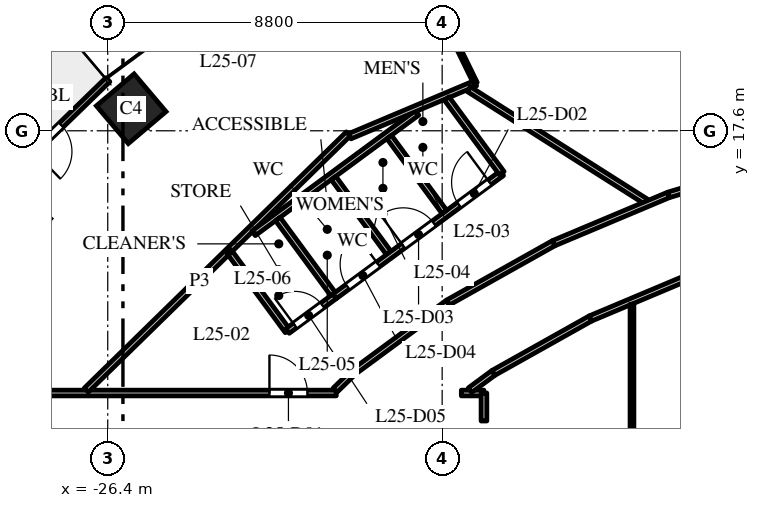
"""IFC4 building model, lengths in metres.
Left out: names, types, materials, properties, quantities, classifications, styles, units other than length and angle.
Written with IfcOpenShell. Run it as: python <this file> out.ifc"""

import sys

from ifc_helpers import new_model, si_unit, direction, frame, frame_2d, origin, origin_2d, place, context, subcontext, project, spatial, rectangle, extrude, element, fill, save


model = new_model("IFC4")
c1 = context("Model", 3, precision=1e-05, world=origin(), true_north=direction((0.0, 1.0)))
c2 = subcontext(c1, "Body", "Model", "MODEL_VIEW")
j1 = project(units=[si_unit("LENGTHUNIT", "METRE"), si_unit("PLANEANGLEUNIT", "RADIAN")], contexts=[c1])
p1 = place(None, origin())
s1 = spatial("IfcSite", under=j1, at=p1, CompositionType="ELEMENT")
p2 = place(p1, origin())
s2 = spatial("IfcBuilding", under=s1, at=p2, CompositionType="ELEMENT")
p3 = place(p2, frame((0.0, 0.0, 112.0)))
s3 = spatial("IfcBuildingStorey", under=s2, at=p3, CompositionType="ELEMENT", Elevation=112.0)
p4 = place(p3, frame((-25.783, 18.18, 0.0), z_axis=(0.0, 0.0, 1.0), x_axis=(-0.763035199656, -0.646356932419, 0.0)))
e1 = element("IfcColumn", 1, at=p4, inside=s3, PredefinedType="COLUMN", context=c2, shape_type="SweptSolid", body=[
    extrude(rectangle(XDim=1.3, YDim=1.3, at=origin_2d()), origin(), (0.0, 0.0, 1.0), 4.0),
])
p5 = place(p3, frame((-26.396, 18.943, 0.0), z_axis=(0.0, 0.0, 1.0), x_axis=(-0.717214761864, -0.696852197647, 0.0)))
e2 = element("IfcWall", 2, at=p5, inside=s3, PredefinedType="STANDARD", context=c2, shape_type="SweptSolid", body=[
    extrude(rectangle(XDim=4.424, YDim=0.15, at=frame_2d((2.212, 0.0))), origin(), (0.0, 0.0, 1.0), 3.7),
])
p6 = place(p5, frame((1.712, 0.0, 0.0)))
e3 = element("IfcOpeningElement", 3, at=p6, cuts=e2, PredefinedType="OPENING", context=c2, shape_type="SweptSolid", body=[
    extrude(rectangle(XDim=1.0, YDim=2.4, at=frame_2d((0.5, 1.2))), frame((0.0, 0.085, 0.0), z_axis=(0.0, -1.0, 0.0), x_axis=(1.0, 0.0, 0.0)), (0.0, 0.0, 1.0), 0.17),
])
p7 = place(p3, frame((-31.5, 10.7, 0.0), z_axis=(0.0, 0.0, 1.0), x_axis=(1.0, 0.0, 0.0)))
e4 = element("IfcWall", 4, at=p7, inside=s3, PredefinedType="PARTITIONING", context=c2, shape_type="SweptSolid", body=[
    extrude(rectangle(XDim=11.113, YDim=0.15, at=frame_2d((5.557, 0.0))), origin(), (0.0, 0.0, 1.0), 3.1),
])
p8 = place(p7, frame((9.355, 0.0, 0.0)))
e5 = element("IfcOpeningElement", 5, at=p8, cuts=e4, PredefinedType="OPENING", context=c2, shape_type="SweptSolid", body=[
    extrude(rectangle(XDim=1.0, YDim=2.1, at=frame_2d((0.5, 1.05))), frame((0.0, 0.085, 0.0), z_axis=(0.0, -1.0, 0.0), x_axis=(1.0, 0.0, 0.0)), (0.0, 0.0, 1.0), 0.17),
])
p9 = place(p7, frame((1.311, 0.0, 0.0)))
e6 = element("IfcOpeningElement", 6, at=p9, cuts=e4, PredefinedType="OPENING", context=c2, shape_type="SweptSolid", body=[
    extrude(rectangle(XDim=1.0, YDim=2.1, at=frame_2d((0.5, 1.05))), frame((0.0, 0.085, 0.0), z_axis=(0.0, -1.0, 0.0), x_axis=(1.0, 0.0, 0.0)), (0.0, 0.0, 1.0), 0.17),
])
p10 = place(p3, frame((-26.964, 10.777, 0.0), z_axis=(0.0, 0.0, 1.0), x_axis=(0.715000199822, 0.69912424808, 0.0)))
e7 = element("IfcWall", 7, at=p10, inside=s3, PredefinedType="PARTITIONING", context=c2, shape_type="SweptSolid", body=[
    extrude(rectangle(XDim=9.642, YDim=0.15, at=frame_2d((4.821, 0.0))), origin(), (0.0, 0.0, 1.0), 2.75),
])
p11 = place(p3, frame((-23.207, 14.422, 0.0), z_axis=(0.0, 0.0, 1.0), x_axis=(0.592948747936, -0.80524020163, 0.0)))
e8 = element("IfcWall", 8, at=p11, inside=s3, PredefinedType="PARTITIONING", context=c2, shape_type="SweptSolid", body=[
    extrude(rectangle(XDim=2.596, YDim=0.15, at=frame_2d((1.298, 0.0))), origin(), (0.0, 0.0, 1.0), 3.7),
])
p12 = place(p3, frame((-22.562, 14.902, 0.0), z_axis=(0.0, 0.0, 1.0), x_axis=(0.805140814791, 0.593083694227, 0.0)))
e9 = element("IfcWall", 9, at=p12, inside=s3, PredefinedType="PARTITIONING", context=c2, shape_type="SweptSolid", body=[
    extrude(rectangle(XDim=5.343, YDim=0.15, at=frame_2d((2.672, 0.0))), origin(), (0.0, 0.0, 1.0), 2.75),
])
p13 = place(p3, frame((-21.925, 15.279, 0.0), z_axis=(0.0, 0.0, 1.0), x_axis=(0.592783466835, -0.805361882291, 0.0)))
e10 = element("IfcWall", 10, at=p13, inside=s3, PredefinedType="PARTITIONING", context=c2, shape_type="SweptSolid", body=[
    extrude(rectangle(XDim=2.525, YDim=0.15, at=frame_2d((1.263, 0.0))), origin(), (0.0, 0.0, 1.0), 3.7),
])
p14 = place(p3, frame((-21.668, 12.332, 0.0), z_axis=(0.0, 0.0, 1.0), x_axis=(0.805239105185, 0.592950236935, 0.0)))
e11 = element("IfcWall", 11, at=p14, inside=s3, PredefinedType="PARTITIONING", context=c2, shape_type="SweptSolid", body=[
    extrude(rectangle(XDim=1.54, YDim=0.15, at=frame_2d((0.77, 0.0))), origin(), (0.0, 0.0, 1.0), 3.7),
])
p15 = place(p14, frame((0.24, 0.0, 0.0)))
e12 = element("IfcOpeningElement", 12, at=p15, cuts=e11, PredefinedType="OPENING", context=c2, shape_type="SweptSolid", body=[
    extrude(rectangle(XDim=0.9, YDim=2.1, at=frame_2d((0.45, 1.05))), frame((0.0, 0.085, 0.0), z_axis=(0.0, -1.0, 0.0), x_axis=(1.0, 0.0, 0.0)), (0.0, 0.0, 1.0), 0.17),
])
p16 = place(p3, frame((-20.46, 16.358, 0.0), z_axis=(0.0, 0.0, 1.0), x_axis=(0.59304615898, -0.805168462695, 0.0)))
e13 = element("IfcWall", 13, at=p16, inside=s3, PredefinedType="PARTITIONING", context=c2, shape_type="SweptSolid", body=[
    extrude(rectangle(XDim=2.451, YDim=0.15, at=frame_2d((1.226, 0.0))), origin(), (0.0, 0.0, 1.0), 3.7),
])
p17 = place(p3, frame((-20.418, 10.775, 0.0), z_axis=(0.0, 0.0, 1.0), x_axis=(0.717033879939, 0.697038316751, 0.0)))
e14 = element("IfcWall", 14, at=p17, inside=s3, PredefinedType="PARTITIONING", context=c2, shape_type="SweptSolid", body=[
    extrude(rectangle(XDim=0.696, YDim=0.15, at=frame_2d((0.348, 0.0))), origin(), (0.0, 0.0, 1.0), 3.7),
])
p18 = place(p3, frame((-20.428, 13.245, 0.0), z_axis=(0.0, 0.0, 1.0), x_axis=(0.80538609279, 0.592750572788, 0.0)))
e15 = element("IfcWall", 15, at=p18, inside=s3, PredefinedType="PARTITIONING", context=c2, shape_type="SweptSolid", body=[
    extrude(rectangle(XDim=5.461, YDim=0.15, at=frame_2d((2.73, 0.0))), origin(), (0.0, 0.0, 1.0), 2.75),
])
p19 = place(p18, frame((4.061, 0.0, 0.0)))
e16 = element("IfcOpeningElement", 16, at=p19, cuts=e15, PredefinedType="OPENING", context=c2, shape_type="SweptSolid", body=[
    extrude(rectangle(XDim=1.0, YDim=2.1, at=frame_2d((0.5, 1.05))), frame((0.0, 0.085, 0.0), z_axis=(0.0, -1.0, 0.0), x_axis=(1.0, 0.0, 0.0)), (0.0, 0.0, 1.0), 0.17),
])
p20 = place(p18, frame((2.24, 0.0, 0.0)))
e17 = element("IfcOpeningElement", 17, at=p20, cuts=e15, PredefinedType="OPENING", context=c2, shape_type="SweptSolid", body=[
    extrude(rectangle(XDim=1.0, YDim=2.1, at=frame_2d((0.5, 1.05))), frame((0.0, 0.085, 0.0), z_axis=(0.0, -1.0, 0.0), x_axis=(1.0, 0.0, 0.0)), (0.0, 0.0, 1.0), 0.17),
])
p21 = place(p18, frame((0.42, 0.0, 0.0)))
e18 = element("IfcOpeningElement", 18, at=p21, cuts=e15, PredefinedType="OPENING", context=c2, shape_type="SweptSolid", body=[
    extrude(rectangle(XDim=1.0, YDim=2.1, at=frame_2d((0.5, 1.05))), frame((0.0, 0.085, 0.0), z_axis=(0.0, -1.0, 0.0), x_axis=(1.0, 0.0, 0.0)), (0.0, 0.0, 1.0), 0.17),
])
p22 = place(p3, frame((-20.028, 17.457, 0.0), z_axis=(0.0, 0.0, 1.0), x_axis=(0.921396911144, 0.388622866201, 0.0)))
e19 = element("IfcWall", 19, at=p22, inside=s3, PredefinedType="PARTITIONING", context=c2, shape_type="SweptSolid", body=[
    extrude(rectangle(XDim=3.587, YDim=0.15, at=frame_2d((1.793, 0.0))), origin(), (0.0, 0.0, 1.0), 3.7),
])
p23 = place(p3, frame((-19.919, 11.26, 0.0), z_axis=(0.0, 0.0, 1.0), x_axis=(0.805185638843, 0.593022838516, 0.0)))
e20 = element("IfcWall", 20, at=p23, inside=s3, PredefinedType="PARTITIONING", context=c2, shape_type="SweptSolid", body=[
    extrude(rectangle(XDim=3.073, YDim=0.15, at=frame_2d((1.536, 0.0))), origin(), (0.0, 0.0, 1.0), 2.75),
])
p24 = place(p3, frame((-19.086, 23.685, 0.0), z_axis=(0.0, 0.0, 1.0), x_axis=(0.439173510656, -0.898402263765, 0.0)))
e21 = element("IfcWall", 21, at=p24, inside=s3, PredefinedType="PARTITIONING", context=c2, shape_type="SweptSolid", body=[
    extrude(rectangle(XDim=5.381, YDim=0.1, at=frame_2d((2.69, 0.0))), origin(), (0.0, 0.0, 1.0), 3.7),
])
p25 = place(p3, frame((-18.995, 17.437, 0.0), z_axis=(0.0, 0.0, 1.0), x_axis=(0.593300972215, -0.80498071801, 0.0)))
e22 = element("IfcWall", 22, at=p25, inside=s3, PredefinedType="PARTITIONING", context=c2, shape_type="SweptSolid", body=[
    extrude(rectangle(XDim=2.451, YDim=0.15, at=frame_2d((1.226, 0.0))), origin(), (0.0, 0.0, 1.0), 3.7),
])
p26 = place(p3, frame((-17.48, 18.449, 0.0), z_axis=(0.0, 0.0, 1.0), x_axis=(0.593277461832, -0.804998045515, 0.0)))
e23 = element("IfcWall", 23, at=p26, inside=s3, PredefinedType="PARTITIONING", context=c2, shape_type="SweptSolid", body=[
    extrude(rectangle(XDim=2.442, YDim=0.15, at=frame_2d((1.221, 0.0))), origin(), (0.0, 0.0, 1.0), 3.7),
])
p27 = place(p3, frame((-17.445, 13.082, 0.0), z_axis=(0.0, 0.0, 1.0), x_axis=(0.872072095629, 0.489377420837, 0.0)))
e24 = element("IfcWall", 24, at=p27, inside=s3, PredefinedType="PARTITIONING", context=c2, shape_type="SweptSolid", body=[
    extrude(rectangle(XDim=3.188, YDim=0.15, at=frame_2d((1.594, 0.0))), origin(), (0.0, 0.0, 1.0), 3.7),
])
p28 = place(p3, frame((-16.899, 18.695, 0.0), z_axis=(0.0, 0.0, 1.0), x_axis=(0.844493920995, -0.535565138337, 0.0)))
e25 = element("IfcWall", 25, at=p28, inside=s3, PredefinedType="PARTITIONING", context=c2, shape_type="SweptSolid", body=[
    extrude(rectangle(XDim=5.512, YDim=0.15, at=frame_2d((2.756, 0.0))), origin(), (0.0, 0.0, 1.0), 2.85),
])
p29 = place(p3, frame((-17.095, 10.7, 0.0), z_axis=(0.0, 0.0, 1.0), x_axis=(1.0, 0.0, 0.0)))
e26 = element("IfcWall", 26, at=p29, inside=s3, PredefinedType="PARTITIONING", context=c2, shape_type="SweptSolid", body=[
    extrude(rectangle(XDim=0.595, YDim=0.15, at=frame_2d((0.297, 0.0))), origin(), (0.0, 0.0, 1.0), 3.7),
])
p30 = place(p3, frame((-16.867, 10.775, 0.0), z_axis=(0.0, 0.0, 1.0), x_axis=(0.804751563869, 0.593611759023, 0.0)))
e27 = element("IfcWall", 27, at=p30, inside=s3, PredefinedType="PARTITIONING", context=c2, shape_type="SweptSolid", body=[
    extrude(rectangle(XDim=0.767, YDim=0.15, at=frame_2d((0.383, 0.0))), origin(), (0.0, 0.0, 1.0), 3.7),
])
p31 = place(p3, frame((-16.5, 9.964, 0.0), z_axis=(0.0, 0.0, 1.0), x_axis=(0.0, 1.0, 0.0)))
e28 = element("IfcWall", 28, at=p31, inside=s3, PredefinedType="PARTITIONING", context=c2, shape_type="SweptSolid", body=[
    extrude(rectangle(XDim=0.736, YDim=0.15, at=frame_2d((0.368, 0.0))), origin(), (0.0, 0.0, 1.0), 3.7),
])
p32 = place(p3, frame((-16.25, 11.23, 0.0), z_axis=(0.0, 0.0, 1.0), x_axis=(0.872147381065, 0.489243237767, 0.0)))
e29 = element("IfcWall", 29, at=p32, inside=s3, PredefinedType="PARTITIONING", context=c2, shape_type="SweptSolid", body=[
    extrude(rectangle(XDim=2.927, YDim=0.15, at=frame_2d((1.464, 0.0))), origin(), (0.0, 0.0, 1.0), 2.75),
])
p33 = place(p3, frame((-14.665, 14.642, 0.0), z_axis=(0.0, 0.0, 1.0), x_axis=(0.921789499058, 0.38769075231, 0.0)))
e30 = element("IfcWall", 30, at=p33, inside=s3, PredefinedType="PARTITIONING", context=c2, shape_type="SweptSolid", body=[
    extrude(rectangle(XDim=3.278, YDim=0.15, at=frame_2d((1.639, 0.0))), origin(), (0.0, 0.0, 1.0), 2.85),
])
p34 = place(p3, frame((-13.697, 12.662, 0.0), z_axis=(0.0, 0.0, 1.0), x_axis=(0.921751821358, 0.387780324183, 0.0)))
e31 = element("IfcWall", 31, at=p34, inside=s3, PredefinedType="PARTITIONING", context=c2, shape_type="SweptSolid", body=[
    extrude(rectangle(XDim=3.038, YDim=0.15, at=frame_2d((1.519, 0.0))), origin(), (0.0, 0.0, 1.0), 2.85),
])
p35 = place(p3, frame((-12.605, -13.036, 0.0), z_axis=(0.0, 0.0, 1.0), x_axis=(0.0, 1.0, 0.0)))
e32 = element("IfcWall", 32, at=p35, inside=s3, PredefinedType="PARTITIONING", context=c2, shape_type="SweptSolid", body=[
    extrude(rectangle(XDim=26.072, YDim=0.1, at=frame_2d((13.036, 0.0))), origin(), (0.0, 0.0, 1.0), 2.75),
])
p36 = place(p3, frame((-11.643, 15.913, 0.0), z_axis=(0.0, 0.0, 1.0), x_axis=(0.957584891346, 0.288151307243, 0.0)))
e33 = element("IfcWall", 33, at=p36, inside=s3, PredefinedType="PARTITIONING", context=c2, shape_type="SweptSolid", body=[
    extrude(rectangle(XDim=3.345, YDim=0.15, at=frame_2d((1.672, 0.0))), origin(), (0.0, 0.0, 1.0), 3.7),
])
p37 = place(p6, origin())
e34 = element("IfcDoor", 34, at=p37, inside=s3, OperationType="SINGLE_SWING_RIGHT", PredefinedType="DOOR", context=c2, shape_type="SweptSolid", body=[
    extrude(rectangle(XDim=1.0, YDim=2.4, at=frame_2d((0.5, 1.2))), frame((0.0, 0.025, 0.0), z_axis=(0.0, -1.0, 0.0), x_axis=(1.0, 0.0, 0.0)), (0.0, 0.0, 1.0), 0.05),
])
fill(e3, e34)
p38 = place(p8, origin())
e35 = element("IfcDoor", 35, at=p38, inside=s3, OperationType="SINGLE_SWING_LEFT", PredefinedType="DOOR", context=c2, shape_type="SweptSolid", body=[
    extrude(rectangle(XDim=1.0, YDim=2.1, at=frame_2d((0.5, 1.05))), frame((0.0, 0.025, 0.0), z_axis=(0.0, -1.0, 0.0), x_axis=(1.0, 0.0, 0.0)), (0.0, 0.0, 1.0), 0.05),
])
fill(e5, e35)
p39 = place(p19, origin())
e36 = element("IfcDoor", 36, at=p39, inside=s3, OperationType="SINGLE_SWING_RIGHT", PredefinedType="DOOR", context=c2, shape_type="SweptSolid", body=[
    extrude(rectangle(XDim=1.0, YDim=2.1, at=frame_2d((0.5, 1.05))), frame((0.0, 0.025, 0.0), z_axis=(0.0, -1.0, 0.0), x_axis=(1.0, 0.0, 0.0)), (0.0, 0.0, 1.0), 0.05),
])
fill(e16, e36)
p40 = place(p20, origin())
e37 = element("IfcDoor", 37, at=p40, inside=s3, OperationType="SINGLE_SWING_LEFT", PredefinedType="DOOR", context=c2, shape_type="SweptSolid", body=[
    extrude(rectangle(XDim=1.0, YDim=2.1, at=frame_2d((0.5, 1.05))), frame((0.0, 0.025, 0.0), z_axis=(0.0, -1.0, 0.0), x_axis=(1.0, 0.0, 0.0)), (0.0, 0.0, 1.0), 0.05),
])
fill(e17, e37)
p41 = place(p21, origin())
e38 = element("IfcDoor", 38, at=p41, inside=s3, OperationType="SINGLE_SWING_RIGHT", PredefinedType="DOOR", context=c2, shape_type="SweptSolid", body=[
    extrude(rectangle(XDim=1.0, YDim=2.1, at=frame_2d((0.5, 1.05))), frame((0.0, 0.025, 0.0), z_axis=(0.0, -1.0, 0.0), x_axis=(1.0, 0.0, 0.0)), (0.0, 0.0, 1.0), 0.05),
])
fill(e18, e38)
p42 = place(p15, origin())
e39 = element("IfcDoor", 39, at=p42, inside=s3, OperationType="SINGLE_SWING_LEFT", PredefinedType="DOOR", context=c2, shape_type="SweptSolid", body=[
    extrude(rectangle(XDim=0.9, YDim=2.1, at=frame_2d((0.45, 1.05))), frame((0.0, 0.025, 0.0), z_axis=(0.0, -1.0, 0.0), x_axis=(1.0, 0.0, 0.0)), (0.0, 0.0, 1.0), 0.05),
])
fill(e12, e39)
save(model, sys.argv[1])
